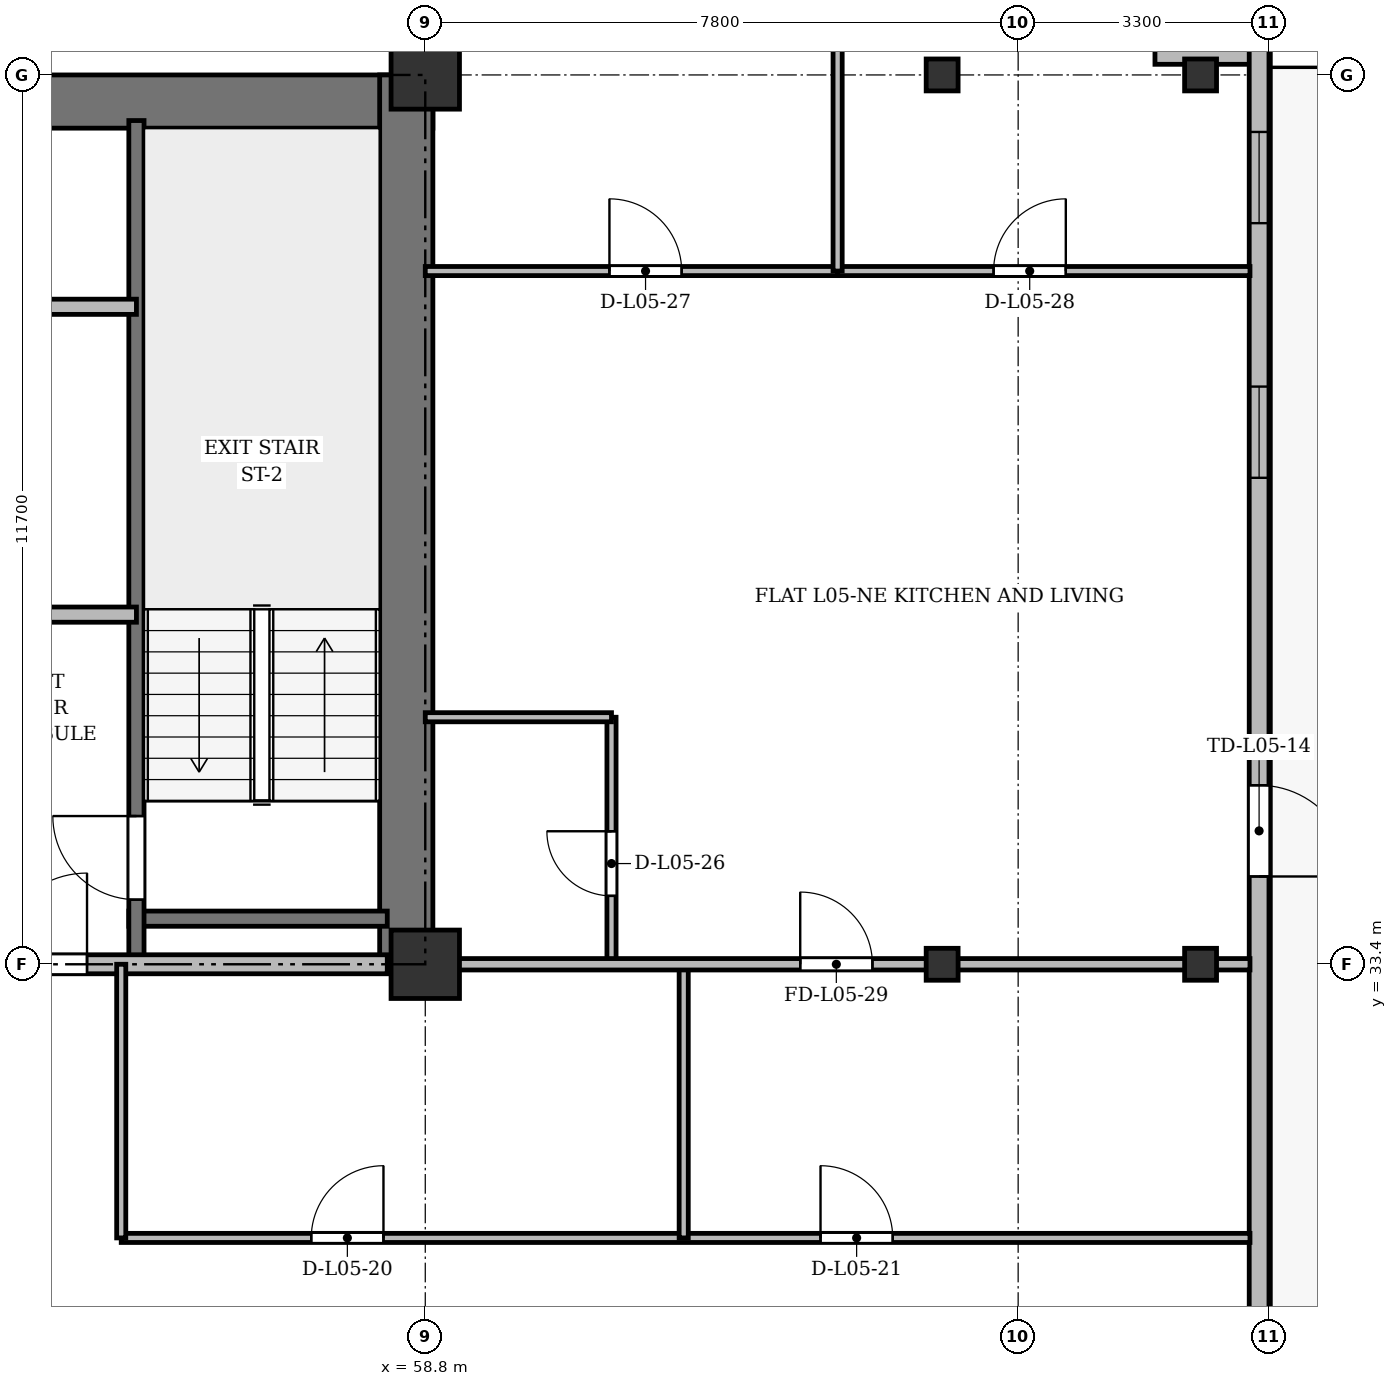
"""IFC4 building model, lengths in metres.
Left out: names, types, materials, properties, quantities, classifications, styles, units other than length and angle.
Written with IfcOpenShell. Run it as: python <this file> out.ifc"""

import sys

from ifc_helpers import new_model, si_unit, direction, frame, frame_2d, origin, origin_2d, place, context, subcontext, project, spatial, rectangle, i_section, extrude, source, transform, mapped, element, fill, save


model = new_model("IFC4")
c1 = context("Model", 3, precision=1e-05, world=origin(), true_north=direction((0.0, 1.0)))
c2 = subcontext(c1, "Body", "Model", "MODEL_VIEW")
j1 = project(units=[si_unit("LENGTHUNIT", "METRE"), si_unit("PLANEANGLEUNIT", "RADIAN")], contexts=[c1])
p1 = place(None, origin())
s1 = spatial("IfcSite", under=j1, at=p1, CompositionType="ELEMENT")
p2 = place(p1, origin())
s2 = spatial("IfcBuilding", under=s1, at=p2, CompositionType="ELEMENT")
p3 = place(p2, frame((0.0, 0.0, 23.5)))
s3 = spatial("IfcBuildingStorey", under=s2, at=p3, CompositionType="ELEMENT", Elevation=23.5)
m1 = source(origin(), c2, "Body", "SweptSolid", [
    extrude(rectangle(XDim=0.9, YDim=0.9, at=origin_2d()), origin(), (0.0, 0.0, 1.0), 3.6),
])
for number, where, z_axis, x_axis in (
    (1, (58.8, 33.4, 0.0), (0.0, 0.0, 1.0), (1.0, 0.0, 0.0)),
    (2, (58.8, 45.1, 0.0), (0.0, 0.0, 1.0), (1.0, 0.0, 0.0)),
):
    element("IfcColumn", number, at=place(p3, frame(where, z_axis=z_axis, x_axis=x_axis)), inside=s3, PredefinedType="COLUMN", context=c2, shape_type="MappedRepresentation", body=[
        mapped(m1, transform((0.0, 0.0, 0.0), x_axis=(1.0, 0.0, 0.0), y_axis=(0.0, 1.0, 0.0), z_axis=(0.0, 0.0, 1.0), scale=1.0)),
    ])
m2 = source(origin(), c2, "Body", "SweptSolid", [
    extrude(i_section(OverallWidth=0.42, OverallDepth=0.42, WebThickness=0.026, FlangeThickness=0.04, at=origin_2d()), origin(), (0.0, 0.0, 1.0), 3.6),
])
for number, where, z_axis, x_axis in (
    (3, (65.6, 33.4, 0.0), (0.0, 0.0, 1.0), (1.0, 0.0, 0.0)),
    (4, (65.6, 45.1, 0.0), (0.0, 0.0, 1.0), (1.0, 0.0, 0.0)),
    (5, (69.0, 33.4, 0.0), (0.0, 0.0, 1.0), (1.0, 0.0, 0.0)),
    (6, (69.0, 45.1, 0.0), (0.0, 0.0, 1.0), (1.0, 0.0, 0.0)),
):
    element("IfcColumn", number, at=place(p3, frame(where, z_axis=z_axis, x_axis=x_axis)), inside=s3, PredefinedType="COLUMN", context=c2, shape_type="MappedRepresentation", body=[
        mapped(m2, transform((0.0, 0.0, 0.0), x_axis=(1.0, 0.0, 0.0), y_axis=(0.0, 1.0, 0.0), z_axis=(0.0, 0.0, 1.0), scale=1.0)),
    ])
p4 = place(p3, frame((68.4, 45.37, 0.0), z_axis=(0.0, 0.0, 1.0), x_axis=(1.0, 0.0, 0.0)))
e7 = element("IfcWall", 7, at=p4, inside=s3, PredefinedType="SOLIDWALL", context=c2, shape_type="SweptSolid", body=[
    extrude(rectangle(XDim=1.5, YDim=0.26, at=frame_2d((0.75, 0.0))), origin(), (0.0, 0.0, 1.0), 2.69),
])
p5 = place(p3, frame((69.77, 45.5, 0.0), z_axis=(0.0, 0.0, 1.0), x_axis=(0.0, -1.0, 0.0)))
e8 = element("IfcWall", 8, at=p5, inside=s3, PredefinedType="SOLIDWALL", context=c2, shape_type="SweptSolid", body=[
    extrude(rectangle(XDim=39.6, YDim=0.26, at=frame_2d((19.8, 0.0))), origin(), (0.0, 0.0, 1.0), 3.34),
])
p6 = place(p5, frame((9.745, 0.0, 0.0)))
e9 = element("IfcOpeningElement", 9, at=p6, cuts=e8, PredefinedType="OPENING", context=c2, shape_type="SweptSolid", body=[
    extrude(rectangle(XDim=1.2, YDim=2.2, at=frame_2d((0.6, 1.1))), frame((0.0, 0.14, 0.0), z_axis=(0.0, -1.0, 0.0), x_axis=(1.0, 0.0, 0.0)), (0.0, 0.0, 1.0), 0.28),
])
p7 = place(p5, frame((36.95, 0.0, 0.92)))
e10 = element("IfcOpeningElement", 10, at=p7, cuts=e8, PredefinedType="OPENING", context=c2, shape_type="SweptSolid", body=[
    extrude(rectangle(XDim=1.2, YDim=1.65, at=frame_2d((0.6, 0.825))), frame((0.0, 0.14, 0.0), z_axis=(0.0, -1.0, 0.0), x_axis=(1.0, 0.0, 0.0)), (0.0, 0.0, 1.0), 0.28),
])
p8 = place(p5, frame((32.9, 0.0, 0.92)))
e11 = element("IfcOpeningElement", 11, at=p8, cuts=e8, PredefinedType="OPENING", context=c2, shape_type="SweptSolid", body=[
    extrude(rectangle(XDim=2.4, YDim=2.1, at=frame_2d((1.2, 1.05))), frame((0.0, 0.14, 0.0), z_axis=(0.0, -1.0, 0.0), x_axis=(1.0, 0.0, 0.0)), (0.0, 0.0, 1.0), 0.28),
])
p9 = place(p5, frame((28.7, 0.0, 0.92)))
e12 = element("IfcOpeningElement", 12, at=p9, cuts=e8, PredefinedType="OPENING", context=c2, shape_type="SweptSolid", body=[
    extrude(rectangle(XDim=2.4, YDim=2.1, at=frame_2d((1.2, 1.05))), frame((0.0, 0.14, 0.0), z_axis=(0.0, -1.0, 0.0), x_axis=(1.0, 0.0, 0.0)), (0.0, 0.0, 1.0), 0.28),
])
p10 = place(p5, frame((4.5, 0.0, 0.92)))
e13 = element("IfcOpeningElement", 13, at=p10, cuts=e8, PredefinedType="OPENING", context=c2, shape_type="SweptSolid", body=[
    extrude(rectangle(XDim=1.2, YDim=1.65, at=frame_2d((0.6, 0.825))), frame((0.0, 0.14, 0.0), z_axis=(0.0, -1.0, 0.0), x_axis=(1.0, 0.0, 0.0)), (0.0, 0.0, 1.0), 0.28),
])
p11 = place(p5, frame((1.15, 0.0, 0.92)))
e14 = element("IfcOpeningElement", 14, at=p11, cuts=e8, PredefinedType="OPENING", context=c2, shape_type="SweptSolid", body=[
    extrude(rectangle(XDim=1.2, YDim=1.65, at=frame_2d((0.6, 0.825))), frame((0.0, 0.14, 0.0), z_axis=(0.0, -1.0, 0.0), x_axis=(1.0, 0.0, 0.0)), (0.0, 0.0, 1.0), 0.28),
])
p12 = place(p3, frame((15.5, 44.75, 0.0), z_axis=(0.0, 0.0, 1.0), x_axis=(1.0, 0.0, 0.0)))
e15 = element("IfcWall", 15, at=p12, inside=s3, PredefinedType="SHEAR", context=c2, shape_type="SweptSolid", body=[
    extrude(rectangle(XDim=43.4, YDim=0.7, at=frame_2d((21.7, 0.0))), origin(), (0.0, 0.0, 1.0), 3.34),
])
p13 = place(p3, frame((58.55, 33.4, 0.0), z_axis=(0.0, 0.0, 1.0), x_axis=(0.0, 1.0, 0.0)))
e16 = element("IfcWall", 16, at=p13, inside=s3, PredefinedType="SHEAR", context=c2, shape_type="SweptSolid", body=[
    extrude(rectangle(XDim=11.7, YDim=0.7, at=frame_2d((5.85, 0.0))), origin(), (0.0, 0.0, 1.0), 3.34),
])
p14 = place(p3, frame((54.9, 34.0, 0.0), z_axis=(0.0, 0.0, 1.0), x_axis=(1.0, 0.0, 0.0)))
e17 = element("IfcWall", 17, at=p14, inside=s3, PredefinedType="SHEAR", context=c2, shape_type="SweptSolid", body=[
    extrude(rectangle(XDim=3.4, YDim=0.2, at=frame_2d((1.7, 0.0))), origin(), (0.0, 0.0, 1.0), 3.34),
])
p15 = place(p3, frame((55.0, 33.4, 0.0), z_axis=(0.0, 0.0, 1.0), x_axis=(0.0, 1.0, 0.0)))
e18 = element("IfcWall", 18, at=p15, inside=s3, PredefinedType="SHEAR", context=c2, shape_type="SweptSolid", body=[
    extrude(rectangle(XDim=11.1, YDim=0.2, at=frame_2d((5.55, 0.0))), origin(), (0.0, 0.0, 1.0), 3.34),
])
p16 = place(p15, frame((0.85, 0.0, 0.0)))
e19 = element("IfcOpeningElement", 19, at=p16, cuts=e18, PredefinedType="OPENING", context=c2, shape_type="SweptSolid", body=[
    extrude(rectangle(XDim=1.1, YDim=2.15, at=frame_2d((0.55, 1.075))), frame((0.0, 0.11, 0.0), z_axis=(0.0, -1.0, 0.0), x_axis=(1.0, 0.0, 0.0)), (0.0, 0.0, 1.0), 0.22),
])
p17 = place(p3, frame((47.15, 42.05, 0.0), z_axis=(0.0, 0.0, 1.0), x_axis=(1.0, 0.0, 0.0)))
e20 = element("IfcWall", 20, at=p17, inside=s3, PredefinedType="SOLIDWALL", context=c2, shape_type="SweptSolid", body=[
    extrude(rectangle(XDim=7.85, YDim=0.2, at=frame_2d((3.925, 0.0))), origin(), (0.0, 0.0, 1.0), 2.752),
])
p18 = place(p17, frame((0.75, 0.0, 0.0)))
e21 = element("IfcOpeningElement", 21, at=p18, cuts=e20, PredefinedType="OPENING", context=c2, shape_type="SweptSolid", body=[
    extrude(rectangle(XDim=0.9, YDim=2.1, at=frame_2d((0.45, 1.05))), frame((0.0, 0.11, 0.0), z_axis=(0.0, -1.0, 0.0), x_axis=(1.0, 0.0, 0.0)), (0.0, 0.0, 1.0), 0.22),
])
p19 = place(p17, frame((3.85, 0.0, 0.0)))
e22 = element("IfcOpeningElement", 22, at=p19, cuts=e20, PredefinedType="OPENING", context=c2, shape_type="SweptSolid", body=[
    extrude(rectangle(XDim=0.9, YDim=2.1, at=frame_2d((0.45, 1.05))), frame((0.0, 0.11, 0.0), z_axis=(0.0, -1.0, 0.0), x_axis=(1.0, 0.0, 0.0)), (0.0, 0.0, 1.0), 0.22),
])
p20 = place(p3, frame((52.45, 38.0, 0.0), z_axis=(0.0, 0.0, 1.0), x_axis=(1.0, 0.0, 0.0)))
e23 = element("IfcWall", 23, at=p20, inside=s3, PredefinedType="PARTITIONING", context=c2, shape_type="SweptSolid", body=[
    extrude(rectangle(XDim=2.55, YDim=0.2, at=frame_2d((1.275, 0.0))), origin(), (0.0, 0.0, 1.0), 3.34),
])
p21 = place(p3, frame((47.15, 33.4, 0.0), z_axis=(0.0, 0.0, 1.0), x_axis=(1.0, 0.0, 0.0)))
e24 = element("IfcWall", 24, at=p21, inside=s3, PredefinedType="PARTITIONING", context=c2, shape_type="SweptSolid", body=[
    extrude(rectangle(XDim=11.15, YDim=0.25, at=frame_2d((5.575, 0.0))), origin(), (0.0, 0.0, 1.0), 2.69),
])
p22 = place(p21, frame((0.7, 0.0, 0.0)))
e25 = element("IfcOpeningElement", 25, at=p22, cuts=e24, PredefinedType="OPENING", context=c2, shape_type="SweptSolid", body=[
    extrude(rectangle(XDim=0.95, YDim=2.15, at=frame_2d((0.475, 1.075))), frame((0.0, 0.135, 0.0), z_axis=(0.0, -1.0, 0.0), x_axis=(1.0, 0.0, 0.0)), (0.0, 0.0, 1.0), 0.27),
])
p23 = place(p21, frame((6.0, 0.0, 0.0)))
e26 = element("IfcOpeningElement", 26, at=p23, cuts=e24, PredefinedType="OPENING", context=c2, shape_type="SweptSolid", body=[
    extrude(rectangle(XDim=1.2, YDim=2.15, at=frame_2d((0.6, 1.075))), frame((0.0, 0.135, 0.0), z_axis=(0.0, -1.0, 0.0), x_axis=(1.0, 0.0, 0.0)), (0.0, 0.0, 1.0), 0.27),
])
p24 = place(p3, frame((54.8, 29.8, 0.0), z_axis=(0.0, 0.0, 1.0), x_axis=(1.0, 0.0, 0.0)))
e27 = element("IfcWall", 27, at=p24, inside=s3, PredefinedType="PARTITIONING", context=c2, shape_type="SweptSolid", body=[
    extrude(rectangle(XDim=14.85, YDim=0.12, at=frame_2d((7.425, 0.0))), origin(), (0.0, 0.0, 1.0), 2.752),
])
p25 = place(p24, frame((2.5, 0.0, 0.0)))
e28 = element("IfcOpeningElement", 28, at=p25, cuts=e27, PredefinedType="OPENING", context=c2, shape_type="SweptSolid", body=[
    extrude(rectangle(XDim=0.95, YDim=2.15, at=frame_2d((0.475, 1.075))), frame((0.0, 0.07, 0.0), z_axis=(0.0, -1.0, 0.0), x_axis=(1.0, 0.0, 0.0)), (0.0, 0.0, 1.0), 0.14),
])
p26 = place(p24, frame((9.2, 0.0, 0.0)))
e29 = element("IfcOpeningElement", 29, at=p26, cuts=e27, PredefinedType="OPENING", context=c2, shape_type="SweptSolid", body=[
    extrude(rectangle(XDim=0.95, YDim=2.15, at=frame_2d((0.475, 1.075))), frame((0.0, 0.07, 0.0), z_axis=(0.0, -1.0, 0.0), x_axis=(1.0, 0.0, 0.0)), (0.0, 0.0, 1.0), 0.14),
])
for number, where, z_axis, x_axis in (
    (30, (62.2, 29.8, 0.0), (0.0, 0.0, 1.0), (0.0, 1.0, 0.0)),
    (31, (54.8, 29.8, 0.0), (0.0, 0.0, 1.0), (0.0, 1.0, 0.0)),
):
    element("IfcWall", number, at=place(p3, frame(where, z_axis=z_axis, x_axis=x_axis)), inside=s3, PredefinedType="PARTITIONING", context=c2, shape_type="SweptSolid", body=[
        extrude(rectangle(XDim=3.6, YDim=0.12, at=frame_2d((1.8, 0.0))), origin(), (0.0, 0.0, 1.0), 2.69),
    ])
p27 = place(p3, frame((61.25, 33.4, 0.0), z_axis=(0.0, 0.0, 1.0), x_axis=(0.0, 1.0, 0.0)))
e32 = element("IfcWall", 32, at=p27, inside=s3, PredefinedType="PARTITIONING", context=c2, shape_type="SweptSolid", body=[
    extrude(rectangle(XDim=3.25, YDim=0.12, at=frame_2d((1.625, 0.0))), origin(), (0.0, 0.0, 1.0), 2.69),
])
p28 = place(p27, frame((0.9, 0.0, 0.0)))
e33 = element("IfcOpeningElement", 33, at=p28, cuts=e32, PredefinedType="OPENING", context=c2, shape_type="SweptSolid", body=[
    extrude(rectangle(XDim=0.85, YDim=2.1, at=frame_2d((0.425, 1.05))), frame((0.0, 0.07, 0.0), z_axis=(0.0, -1.0, 0.0), x_axis=(1.0, 0.0, 0.0)), (0.0, 0.0, 1.0), 0.14),
])
p29 = place(p3, frame((58.8, 36.65, 0.0), z_axis=(0.0, 0.0, 1.0), x_axis=(1.0, 0.0, 0.0)))
e34 = element("IfcWall", 34, at=p29, inside=s3, PredefinedType="PARTITIONING", context=c2, shape_type="SweptSolid", body=[
    extrude(rectangle(XDim=2.45, YDim=0.12, at=frame_2d((1.225, 0.0))), origin(), (0.0, 0.0, 1.0), 2.752),
])
p30 = place(p3, frame((58.8, 42.52, 0.0), z_axis=(0.0, 0.0, 1.0), x_axis=(1.0, 0.0, 0.0)))
e35 = element("IfcWall", 35, at=p30, inside=s3, PredefinedType="PARTITIONING", context=c2, shape_type="SweptSolid", body=[
    extrude(rectangle(XDim=5.425, YDim=0.12, at=frame_2d((2.712, 0.0))), origin(), (0.0, 0.0, 1.0), 2.752),
])
p31 = place(p30, frame((2.423, 0.0, 0.0)))
e36 = element("IfcOpeningElement", 36, at=p31, cuts=e35, PredefinedType="OPENING", context=c2, shape_type="SweptSolid", body=[
    extrude(rectangle(XDim=0.95, YDim=2.15, at=frame_2d((0.475, 1.075))), frame((0.0, 0.07, 0.0), z_axis=(0.0, -1.0, 0.0), x_axis=(1.0, 0.0, 0.0)), (0.0, 0.0, 1.0), 0.14),
])
p32 = place(p3, frame((64.225, 42.52, 0.0), z_axis=(0.0, 0.0, 1.0), x_axis=(1.0, 0.0, 0.0)))
e37 = element("IfcWall", 37, at=p32, inside=s3, PredefinedType="PARTITIONING", context=c2, shape_type="SweptSolid", body=[
    extrude(rectangle(XDim=5.425, YDim=0.12, at=frame_2d((2.712, 0.0))), origin(), (0.0, 0.0, 1.0), 2.752),
])
p33 = place(p32, frame((2.052, 0.0, 0.0)))
e38 = element("IfcOpeningElement", 38, at=p33, cuts=e37, PredefinedType="OPENING", context=c2, shape_type="SweptSolid", body=[
    extrude(rectangle(XDim=0.95, YDim=2.15, at=frame_2d((0.475, 1.075))), frame((0.0, 0.07, 0.0), z_axis=(0.0, -1.0, 0.0), x_axis=(1.0, 0.0, 0.0)), (0.0, 0.0, 1.0), 0.14),
])
p34 = place(p3, frame((64.225, 42.52, 0.0), z_axis=(0.0, 0.0, 1.0), x_axis=(0.0, 1.0, 0.0)))
e39 = element("IfcWall", 39, at=p34, inside=s3, PredefinedType="PARTITIONING", context=c2, shape_type="SweptSolid", body=[
    extrude(rectangle(XDim=5.72, YDim=0.12, at=frame_2d((2.86, 0.0))), origin(), (0.0, 0.0, 1.0), 2.69),
])
p35 = place(p3, frame((58.8, 33.4, 0.0), z_axis=(0.0, 0.0, 1.0), x_axis=(1.0, 0.0, 0.0)))
e40 = element("IfcWall", 40, at=p35, inside=s3, PredefinedType="PARTITIONING", context=c2, shape_type="SweptSolid", body=[
    extrude(rectangle(XDim=10.85, YDim=0.15, at=frame_2d((5.425, 0.0))), origin(), (0.0, 0.0, 1.0), 2.69),
])
p36 = place(p35, frame((4.933, 0.0, 0.0)))
e41 = element("IfcOpeningElement", 41, at=p36, cuts=e40, PredefinedType="OPENING", context=c2, shape_type="SweptSolid", body=[
    extrude(rectangle(XDim=0.95, YDim=2.15, at=frame_2d((0.475, 1.075))), frame((0.0, 0.085, 0.0), z_axis=(0.0, -1.0, 0.0), x_axis=(1.0, 0.0, 0.0)), (0.0, 0.0, 1.0), 0.17),
])
p37 = place(p3, frame((58.8, 44.75, 0.0), z_axis=(0.0, 0.0, 1.0), x_axis=(0.0, 1.0, 0.0)))
e42 = element("IfcWall", 42, at=p37, inside=s3, PredefinedType="PARTITIONING", context=c2, shape_type="SweptSolid", body=[
    extrude(rectangle(XDim=3.61, YDim=0.15, at=frame_2d((1.805, 0.0))), origin(), (0.0, 0.0, 1.0), 2.752),
])
p38 = place(p37, frame((1.1, 0.0, 0.0)))
e43 = element("IfcOpeningElement", 43, at=p38, cuts=e42, PredefinedType="OPENING", context=c2, shape_type="SweptSolid", body=[
    extrude(rectangle(XDim=0.95, YDim=2.15, at=frame_2d((0.475, 1.075))), frame((0.0, 0.085, 0.0), z_axis=(0.0, -1.0, 0.0), x_axis=(1.0, 0.0, 0.0)), (0.0, 0.0, 1.0), 0.17),
])
m3 = source(origin(), c2, "Body", "SweptSolid", [
    extrude(rectangle(XDim=1.2, YDim=2.2, at=frame_2d((0.6, 1.1))), frame((0.0, 0.025, 0.0), z_axis=(0.0, -1.0, 0.0), x_axis=(1.0, 0.0, 0.0)), (0.0, 0.0, 1.0), 0.05),
])
p39 = place(p6, origin())
e44 = element("IfcDoor", 44, at=p39, inside=s3, OperationType="SINGLE_SWING_RIGHT", PredefinedType="DOOR", context=c2, shape_type="MappedRepresentation", body=[
    mapped(m3, transform((0.0, 0.0, 0.0), x_axis=(1.0, 0.0, 0.0), y_axis=(0.0, 1.0, 0.0), z_axis=(0.0, 0.0, 1.0), scale=1.0)),
])
fill(e9, e44)
m4 = source(origin(), c2, "Body", "SweptSolid", [
    extrude(rectangle(XDim=1.2, YDim=1.65, at=frame_2d((0.6, 0.825))), frame((0.0, 0.03, 0.0), z_axis=(0.0, -1.0, 0.0), x_axis=(1.0, 0.0, 0.0)), (0.0, 0.0, 1.0), 0.06),
])
p40 = place(p10, origin())
e45 = element("IfcWindow", 45, at=p40, inside=s3, PartitioningType="SINGLE_PANEL", PredefinedType="WINDOW", context=c2, shape_type="MappedRepresentation", body=[
    mapped(m4, transform((0.0, 0.0, 0.0), x_axis=(1.0, 0.0, 0.0), y_axis=(0.0, 1.0, 0.0), z_axis=(0.0, 0.0, 1.0), scale=1.0)),
])
fill(e13, e45)
p41 = place(p11, origin())
e46 = element("IfcWindow", 46, at=p41, inside=s3, PartitioningType="SINGLE_PANEL", PredefinedType="WINDOW", context=c2, shape_type="MappedRepresentation", body=[
    mapped(m4, transform((0.0, 0.0, 0.0), x_axis=(1.0, 0.0, 0.0), y_axis=(0.0, 1.0, 0.0), z_axis=(0.0, 0.0, 1.0), scale=1.0)),
])
fill(e14, e46)
m5 = source(origin(), c2, "Body", "SweptSolid", [
    extrude(rectangle(XDim=1.1, YDim=2.15, at=frame_2d((0.55, 1.075))), frame((0.0, 0.025, 0.0), z_axis=(0.0, -1.0, 0.0), x_axis=(1.0, 0.0, 0.0)), (0.0, 0.0, 1.0), 0.05),
])
p42 = place(p16, origin())
e47 = element("IfcDoor", 47, at=p42, inside=s3, OperationType="SINGLE_SWING_RIGHT", PredefinedType="DOOR", context=c2, shape_type="MappedRepresentation", body=[
    mapped(m5, transform((0.0, 0.0, 0.0), x_axis=(1.0, 0.0, 0.0), y_axis=(0.0, 1.0, 0.0), z_axis=(0.0, 0.0, 1.0), scale=1.0)),
])
fill(e19, e47)
m6 = source(origin(), c2, "Body", "SweptSolid", [
    extrude(rectangle(XDim=1.2, YDim=2.15, at=frame_2d((0.6, 1.075))), frame((0.0, 0.025, 0.0), z_axis=(0.0, -1.0, 0.0), x_axis=(1.0, 0.0, 0.0)), (0.0, 0.0, 1.0), 0.05),
])
p43 = place(p23, origin())
e48 = element("IfcDoor", 48, at=p43, inside=s3, OperationType="SINGLE_SWING_RIGHT", PredefinedType="DOOR", context=c2, shape_type="MappedRepresentation", body=[
    mapped(m6, transform((0.0, 0.0, 0.0), x_axis=(1.0, 0.0, 0.0), y_axis=(0.0, 1.0, 0.0), z_axis=(0.0, 0.0, 1.0), scale=1.0)),
])
fill(e26, e48)
m7 = source(origin(), c2, "Body", "SweptSolid", [
    extrude(rectangle(XDim=0.95, YDim=2.15, at=frame_2d((0.475, 1.075))), frame((0.0, 0.025, 0.0), z_axis=(0.0, -1.0, 0.0), x_axis=(1.0, 0.0, 0.0)), (0.0, 0.0, 1.0), 0.05),
])
p44 = place(p25, origin())
e49 = element("IfcDoor", 49, at=p44, inside=s3, OperationType="SINGLE_SWING_RIGHT", PredefinedType="DOOR", context=c2, shape_type="MappedRepresentation", body=[
    mapped(m7, transform((0.0, 0.0, 0.0), x_axis=(1.0, 0.0, 0.0), y_axis=(0.0, 1.0, 0.0), z_axis=(0.0, 0.0, 1.0), scale=1.0)),
])
fill(e28, e49)
p45 = place(p26, origin())
e50 = element("IfcDoor", 50, at=p45, inside=s3, OperationType="SINGLE_SWING_LEFT", PredefinedType="DOOR", context=c2, shape_type="MappedRepresentation", body=[
    mapped(m7, transform((0.0, 0.0, 0.0), x_axis=(1.0, 0.0, 0.0), y_axis=(0.0, 1.0, 0.0), z_axis=(0.0, 0.0, 1.0), scale=1.0)),
])
fill(e29, e50)
m8 = source(origin(), c2, "Body", "SweptSolid", [
    extrude(rectangle(XDim=0.85, YDim=2.1, at=frame_2d((0.425, 1.05))), frame((0.0, 0.025, 0.0), z_axis=(0.0, -1.0, 0.0), x_axis=(1.0, 0.0, 0.0)), (0.0, 0.0, 1.0), 0.05),
])
p46 = place(p28, origin())
e51 = element("IfcDoor", 51, at=p46, inside=s3, OperationType="SINGLE_SWING_RIGHT", PredefinedType="DOOR", context=c2, shape_type="MappedRepresentation", body=[
    mapped(m8, transform((0.0, 0.0, 0.0), x_axis=(1.0, 0.0, 0.0), y_axis=(0.0, 1.0, 0.0), z_axis=(0.0, 0.0, 1.0), scale=1.0)),
])
fill(e33, e51)
p47 = place(p31, origin())
e52 = element("IfcDoor", 52, at=p47, inside=s3, OperationType="SINGLE_SWING_LEFT", PredefinedType="DOOR", context=c2, shape_type="MappedRepresentation", body=[
    mapped(m7, transform((0.0, 0.0, 0.0), x_axis=(1.0, 0.0, 0.0), y_axis=(0.0, 1.0, 0.0), z_axis=(0.0, 0.0, 1.0), scale=1.0)),
])
fill(e36, e52)
p48 = place(p33, origin())
e53 = element("IfcDoor", 53, at=p48, inside=s3, OperationType="SINGLE_SWING_RIGHT", PredefinedType="DOOR", context=c2, shape_type="MappedRepresentation", body=[
    mapped(m7, transform((0.0, 0.0, 0.0), x_axis=(1.0, 0.0, 0.0), y_axis=(0.0, 1.0, 0.0), z_axis=(0.0, 0.0, 1.0), scale=1.0)),
])
fill(e38, e53)
p49 = place(p36, origin())
e54 = element("IfcDoor", 54, at=p49, inside=s3, OperationType="SINGLE_SWING_LEFT", PredefinedType="DOOR", context=c2, shape_type="MappedRepresentation", body=[
    mapped(m7, transform((0.0, 0.0, 0.0), x_axis=(1.0, 0.0, 0.0), y_axis=(0.0, 1.0, 0.0), z_axis=(0.0, 0.0, 1.0), scale=1.0)),
])
fill(e41, e54)
save(model, sys.argv[1])
